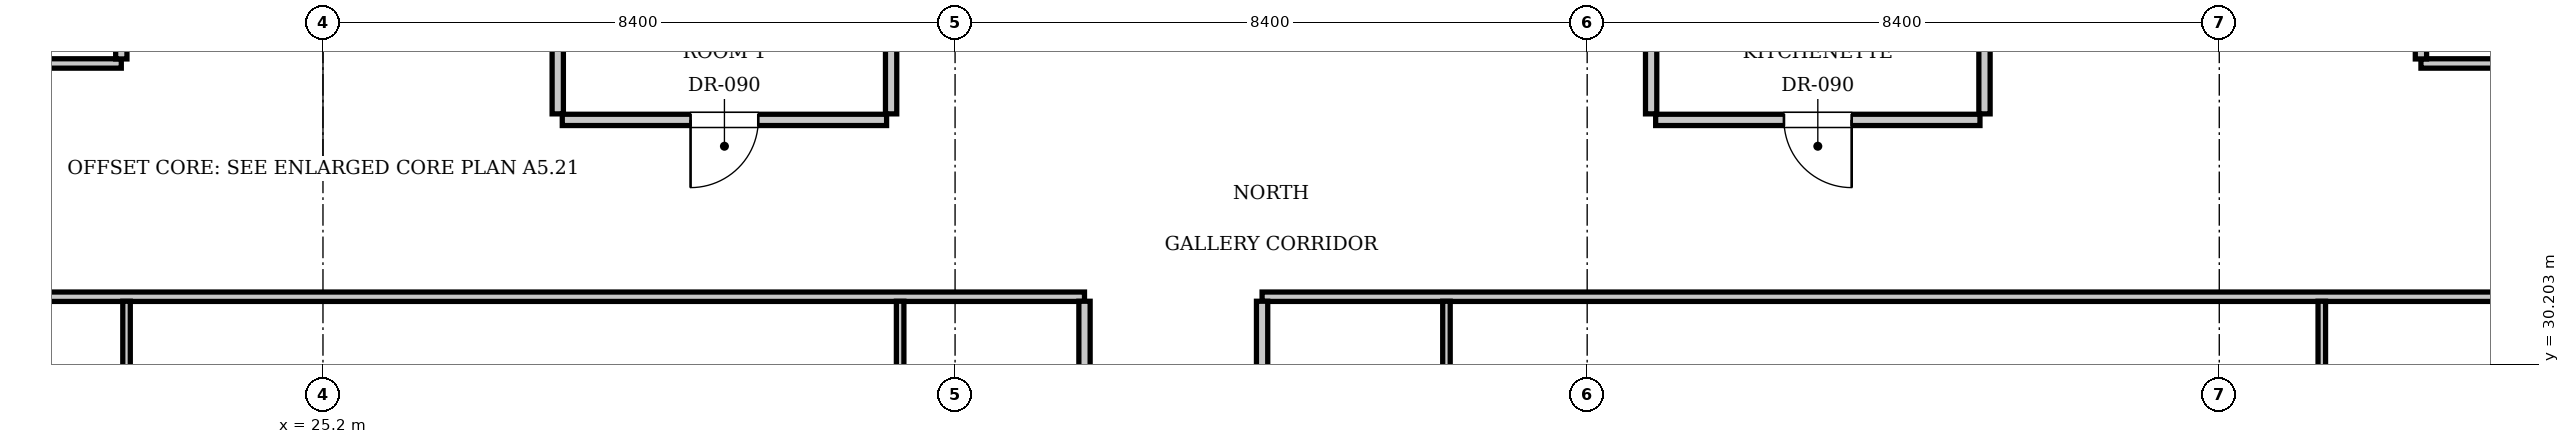
"""IFC4 building model, lengths in metres.
Left out: names, types, materials, properties, quantities, classifications, styles, units other than length and angle.
Written with IfcOpenShell. Run it as: python <this file> out.ifc"""

import sys

from ifc_helpers import new_model, si_unit, direction, frame, frame_2d, origin, place, context, subcontext, project, spatial, rectangle, extrude, element, fill, save


model = new_model("IFC4")
c1 = context("Model", 3, precision=1e-05, world=origin(), true_north=direction((0.0, 1.0)))
c2 = subcontext(c1, "Body", "Model", "MODEL_VIEW")
j1 = project(units=[si_unit("LENGTHUNIT", "METRE"), si_unit("PLANEANGLEUNIT", "RADIAN")], contexts=[c1])
p1 = place(None, origin())
s1 = spatial("IfcSite", under=j1, at=p1, CompositionType="ELEMENT")
p2 = place(p1, origin())
s2 = spatial("IfcBuilding", under=s1, at=p2, CompositionType="ELEMENT")
p3 = place(p2, frame((0.0, 0.0, 142.8)))
s3 = spatial("IfcBuildingStorey", under=s2, at=p3, CompositionType="ELEMENT", Elevation=142.8)
for number, where, z_axis, x_axis in (
    (1, (28.32, 33.53, 0.0), (0.0, 0.0, 1.0), (0.0, 1.0, 0.0)),
    (2, (32.75, 33.53, 0.0), (0.0, 0.0, 1.0), (0.0, 1.0, 0.0)),
):
    element("IfcWall", number, at=place(p3, frame(where, z_axis=z_axis, x_axis=x_axis)), inside=s3, PredefinedType="PARTITIONING", context=c2, shape_type="SweptSolid", body=[
        extrude(rectangle(XDim=2.59, YDim=0.15, at=frame_2d((1.295, 0.0))), origin(), (0.0, 0.0, 1.0), 3.61),
    ])
p4 = place(p3, frame((28.38, 33.45, 0.0), z_axis=(0.0, 0.0, 1.0), x_axis=(1.0, 0.0, 0.0)))
e3 = element("IfcWall", 3, at=p4, inside=s3, PredefinedType="PARTITIONING", context=c2, shape_type="SweptSolid", body=[
    extrude(rectangle(XDim=4.31, YDim=0.15, at=frame_2d((2.155, 0.0))), origin(), (0.0, 0.0, 1.0), 3.61),
])
p5 = place(p4, frame((1.705, 0.0, 0.0)))
e4 = element("IfcOpeningElement", 4, at=p5, cuts=e3, PredefinedType="OPENING", context=c2, shape_type="SweptSolid", body=[
    extrude(rectangle(XDim=0.9, YDim=2.1, at=frame_2d((0.45, 1.05))), frame((0.0, 0.085, 0.0), z_axis=(0.0, -1.0, 0.0), x_axis=(1.0, 0.0, 0.0)), (0.0, 0.0, 1.0), 0.17),
])
for number, where, z_axis, x_axis in (
    (5, (42.85, 33.53, 0.0), (0.0, 0.0, 1.0), (0.0, 1.0, 0.0)),
    (6, (47.28, 33.53, 0.0), (0.0, 0.0, 1.0), (0.0, 1.0, 0.0)),
):
    element("IfcWall", number, at=place(p3, frame(where, z_axis=z_axis, x_axis=x_axis)), inside=s3, PredefinedType="PARTITIONING", context=c2, shape_type="SweptSolid", body=[
        extrude(rectangle(XDim=2.59, YDim=0.15, at=frame_2d((1.295, 0.0))), origin(), (0.0, 0.0, 1.0), 3.61),
    ])
p6 = place(p3, frame((42.91, 33.45, 0.0), z_axis=(0.0, 0.0, 1.0), x_axis=(1.0, 0.0, 0.0)))
e7 = element("IfcWall", 7, at=p6, inside=s3, PredefinedType="PARTITIONING", context=c2, shape_type="SweptSolid", body=[
    extrude(rectangle(XDim=4.31, YDim=0.15, at=frame_2d((2.155, 0.0))), origin(), (0.0, 0.0, 1.0), 3.61),
])
p7 = place(p6, frame((1.705, 0.0, 0.0)))
e8 = element("IfcOpeningElement", 8, at=p7, cuts=e7, PredefinedType="OPENING", context=c2, shape_type="SweptSolid", body=[
    extrude(rectangle(XDim=0.9, YDim=2.1, at=frame_2d((0.45, 1.05))), frame((0.0, 0.085, 0.0), z_axis=(0.0, -1.0, 0.0), x_axis=(1.0, 0.0, 0.0)), (0.0, 0.0, 1.0), 0.17),
])
p8 = place(p3, frame((13.2, 31.1, 0.0), z_axis=(0.0, 0.0, 1.0), x_axis=(1.0, 0.0, 0.0)))
e9 = element("IfcWall", 9, at=p8, inside=s3, PredefinedType="PARTITIONING", context=c2, shape_type="SweptSolid", body=[
    extrude(rectangle(XDim=22.12, YDim=0.125, at=frame_2d((11.06, 0.0))), origin(), (0.0, 0.0, 1.0), 3.61),
])
p9 = place(p3, frame((37.68, 31.1, 0.0), z_axis=(0.0, 0.0, 1.0), x_axis=(1.0, 0.0, 0.0)))
e10 = element("IfcWall", 10, at=p9, inside=s3, PredefinedType="PARTITIONING", context=c2, shape_type="SweptSolid", body=[
    extrude(rectangle(XDim=24.72, YDim=0.125, at=frame_2d((12.36, 0.0))), origin(), (0.0, 0.0, 1.0), 3.61),
])
p10 = place(p3, frame((35.32, 29.15, 0.0), z_axis=(0.0, 0.0, 1.0), x_axis=(0.0, 1.0, 0.0)))
e11 = element("IfcWall", 11, at=p10, inside=s3, PredefinedType="PARTITIONING", context=c2, shape_type="SweptSolid", body=[
    extrude(rectangle(XDim=1.89, YDim=0.15, at=frame_2d((0.945, 0.0))), origin(), (0.0, 0.0, 1.0), 3.61),
])
p11 = place(p3, frame((32.87, 29.15, 0.0), z_axis=(0.0, 0.0, 1.0), x_axis=(0.0, 1.0, 0.0)))
e12 = element("IfcWall", 12, at=p11, inside=s3, PredefinedType="PARTITIONING", context=c2, shape_type="SweptSolid", body=[
    extrude(rectangle(XDim=1.89, YDim=0.1, at=frame_2d((0.945, 0.0))), origin(), (0.0, 0.0, 1.0), 3.61),
])
p12 = place(p3, frame((22.59, 26.43, 0.0), z_axis=(0.0, 0.0, 1.0), x_axis=(0.0, 1.0, 0.0)))
e13 = element("IfcWall", 13, at=p12, inside=s3, PredefinedType="PARTITIONING", context=c2, shape_type="SweptSolid", body=[
    extrude(rectangle(XDim=4.61, YDim=0.1, at=frame_2d((2.305, 0.0))), origin(), (0.0, 0.0, 1.0), 3.61),
])
p13 = place(p12, frame((1.855, 0.0, 0.0)))
e14 = element("IfcOpeningElement", 14, at=p13, cuts=e13, PredefinedType="OPENING", context=c2, shape_type="SweptSolid", body=[
    extrude(rectangle(XDim=0.9, YDim=2.1, at=frame_2d((0.45, 1.05))), frame((0.0, 0.06, 0.0), z_axis=(0.0, -1.0, 0.0), x_axis=(1.0, 0.0, 0.0)), (0.0, 0.0, 1.0), 0.12),
])
p14 = place(p3, frame((37.68, 29.15, 0.0), z_axis=(0.0, 0.0, 1.0), x_axis=(0.0, 1.0, 0.0)))
e15 = element("IfcWall", 15, at=p14, inside=s3, PredefinedType="PARTITIONING", context=c2, shape_type="SweptSolid", body=[
    extrude(rectangle(XDim=1.89, YDim=0.15, at=frame_2d((0.945, 0.0))), origin(), (0.0, 0.0, 1.0), 3.61),
])
p15 = place(p3, frame((40.13, 29.15, 0.0), z_axis=(0.0, 0.0, 1.0), x_axis=(0.0, 1.0, 0.0)))
e16 = element("IfcWall", 16, at=p15, inside=s3, PredefinedType="PARTITIONING", context=c2, shape_type="SweptSolid", body=[
    extrude(rectangle(XDim=1.89, YDim=0.1, at=frame_2d((0.945, 0.0))), origin(), (0.0, 0.0, 1.0), 3.61),
])
p16 = place(p3, frame((51.762, 26.43, 0.0), z_axis=(0.0, 0.0, 1.0), x_axis=(0.0, 1.0, 0.0)))
e17 = element("IfcWall", 17, at=p16, inside=s3, PredefinedType="PARTITIONING", context=c2, shape_type="SweptSolid", body=[
    extrude(rectangle(XDim=4.61, YDim=0.1, at=frame_2d((2.305, 0.0))), origin(), (0.0, 0.0, 1.0), 3.61),
])
p17 = place(p16, frame((1.855, 0.0, 0.0)))
e18 = element("IfcOpeningElement", 18, at=p17, cuts=e17, PredefinedType="OPENING", context=c2, shape_type="SweptSolid", body=[
    extrude(rectangle(XDim=0.9, YDim=2.1, at=frame_2d((0.45, 1.05))), frame((0.0, 0.06, 0.0), z_axis=(0.0, -1.0, 0.0), x_axis=(1.0, 0.0, 0.0)), (0.0, 0.0, 1.0), 0.12),
])
p18 = place(p3, frame((13.2, 34.2, 0.0), z_axis=(0.0, 0.0, 1.0), x_axis=(1.0, 0.0, 0.0)))
e19 = element("IfcWall", 19, at=p18, inside=s3, PredefinedType="PARTITIONING", context=c2, shape_type="SweptSolid", body=[
    extrude(rectangle(XDim=9.32, YDim=0.125, at=frame_2d((4.66, 0.0))), origin(), (0.0, 0.0, 1.0), 3.61),
])
p19 = place(p3, frame((53.08, 34.2, 0.0), z_axis=(0.0, 0.0, 1.0), x_axis=(1.0, 0.0, 0.0)))
e20 = element("IfcWall", 20, at=p19, inside=s3, PredefinedType="PARTITIONING", context=c2, shape_type="SweptSolid", body=[
    extrude(rectangle(XDim=9.32, YDim=0.125, at=frame_2d((4.66, 0.0))), origin(), (0.0, 0.0, 1.0), 3.61),
])
for number, where, z_axis, x_axis in (
    (21, (22.52, 34.26, 0.0), (0.0, 0.0, 1.0), (0.0, 1.0, 0.0)),
    (22, (53.08, 34.26, 0.0), (0.0, 0.0, 1.0), (0.0, 1.0, 0.0)),
):
    element("IfcWall", number, at=place(p3, frame(where, z_axis=z_axis, x_axis=x_axis)), inside=s3, PredefinedType="PARTITIONING", context=c2, shape_type="SweptSolid", body=[
        extrude(rectangle(XDim=2.29, YDim=0.15, at=frame_2d((1.145, 0.0))), origin(), (0.0, 0.0, 1.0), 3.61),
    ])
p20 = place(p5, frame((0.9, 0.0, 0.0), z_axis=(0.0, 0.0, 1.0), x_axis=(-1.0, 0.0, 0.0)))
e23 = element("IfcDoor", 23, at=p20, inside=s3, OperationType="SINGLE_SWING_RIGHT", PredefinedType="DOOR", context=c2, shape_type="SweptSolid", body=[
    extrude(rectangle(XDim=0.9, YDim=2.1, at=frame_2d((0.45, 1.05))), frame((0.0, 0.025, 0.0), z_axis=(0.0, -1.0, 0.0), x_axis=(1.0, 0.0, 0.0)), (0.0, 0.0, 1.0), 0.05),
])
fill(e4, e23)
p21 = place(p7, frame((0.9, 0.0, 0.0), z_axis=(0.0, 0.0, 1.0), x_axis=(-1.0, 0.0, 0.0)))
e24 = element("IfcDoor", 24, at=p21, inside=s3, OperationType="SINGLE_SWING_LEFT", PredefinedType="DOOR", context=c2, shape_type="SweptSolid", body=[
    extrude(rectangle(XDim=0.9, YDim=2.1, at=frame_2d((0.45, 1.05))), frame((0.0, 0.025, 0.0), z_axis=(0.0, -1.0, 0.0), x_axis=(1.0, 0.0, 0.0)), (0.0, 0.0, 1.0), 0.05),
])
fill(e8, e24)
save(model, sys.argv[1])
